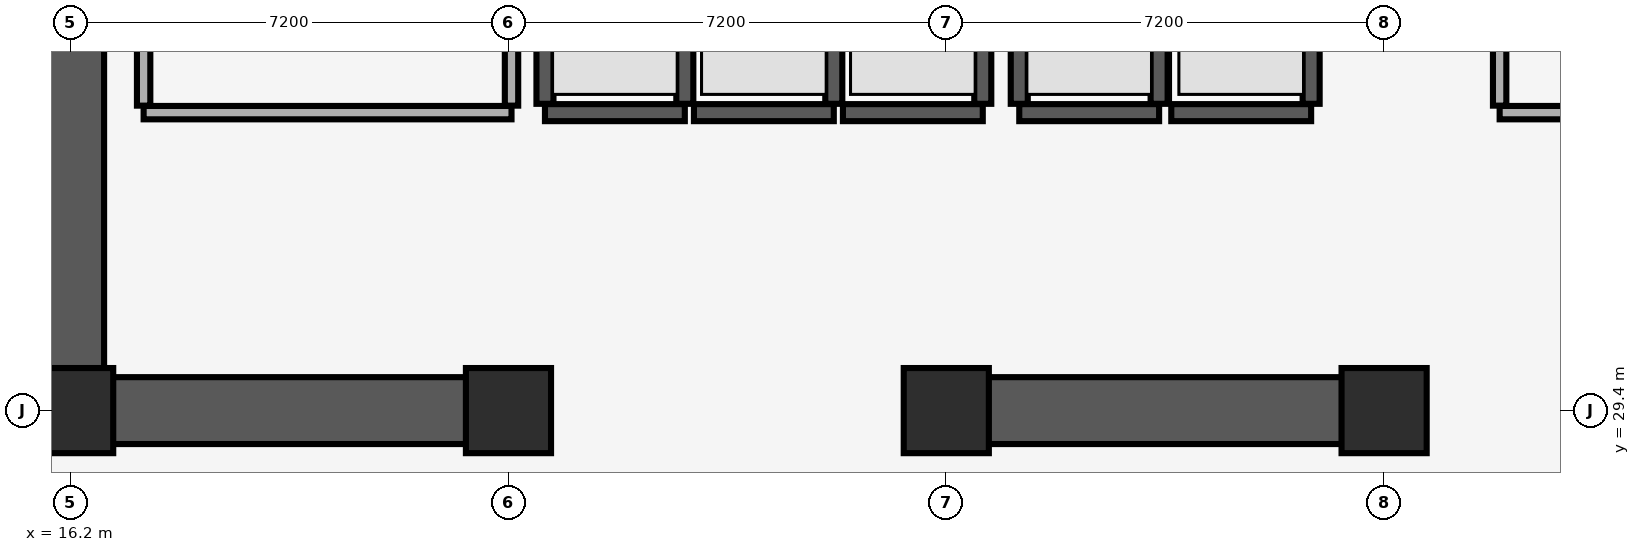
"""IFC4 building model, lengths in metres.
Left out: names, types, materials, properties, quantities, classifications, styles, units other than length and angle.
Written with IfcOpenShell. Run it as: python <this file> out.ifc"""

import sys

from ifc_helpers import new_model, si_unit, direction, frame, frame_2d, origin, origin_2d, place, context, subcontext, project, spatial, rectangle, extrude, element, fill, save


model = new_model("IFC4")
c1 = context("Model", 3, precision=1e-05, world=origin(), true_north=direction((0.0, 1.0)))
c2 = subcontext(c1, "Body", "Model", "MODEL_VIEW")
j1 = project(units=[si_unit("LENGTHUNIT", "METRE"), si_unit("PLANEANGLEUNIT", "RADIAN")], contexts=[c1])
p1 = place(None, origin())
s1 = spatial("IfcSite", under=j1, at=p1, CompositionType="ELEMENT")
p2 = place(p1, origin())
s2 = spatial("IfcBuilding", under=s1, at=p2, CompositionType="ELEMENT")
p3 = place(p2, frame((0.0, 0.0, 8.0)))
s3 = spatial("IfcBuildingStorey", under=s2, at=p3, CompositionType="ELEMENT", Elevation=8.0)
for number, where, z_axis, x_axis in (
    (1, (16.2, 29.4, 0.0), (0.0, 0.0, 1.0), (1.0, 0.0, 0.0)),
    (2, (23.4, 29.4, 0.0), (0.0, 0.0, 1.0), (1.0, 0.0, 0.0)),
    (3, (30.6, 29.4, 0.0), (0.0, 0.0, 1.0), (1.0, 0.0, 0.0)),
    (4, (37.8, 29.4, 0.0), (0.0, 0.0, 1.0), (1.0, 0.0, 0.0)),
):
    element("IfcColumn", number, at=place(p3, frame(where, z_axis=z_axis, x_axis=x_axis)), inside=s3, PredefinedType="COLUMN", context=c2, shape_type="SweptSolid", body=[
        extrude(rectangle(XDim=1.4, YDim=1.4, at=origin_2d()), origin(), (0.0, 0.0, 1.0), 5.68),
    ])
p4 = place(p3, frame((16.2, 29.4, 0.0), z_axis=(0.0, 0.0, 1.0), x_axis=(0.0, 1.0, 0.0)))
e5 = element("IfcWall", 5, at=p4, inside=s3, PredefinedType="SHEAR", context=c2, shape_type="SweptSolid", body=[
    extrude(rectangle(XDim=19.2, YDim=1.1, at=frame_2d((9.6, 0.0))), origin(), (0.0, 0.0, 1.0), 5.68),
])
p5 = place(p3, frame((16.755, 29.4, 0.0), z_axis=(0.0, 0.0, 1.0), x_axis=(1.0, 0.0, 0.0)))
e6 = element("IfcWall", 6, at=p5, inside=s3, PredefinedType="SHEAR", context=c2, shape_type="SweptSolid", body=[
    extrude(rectangle(XDim=6.845, YDim=1.1, at=frame_2d((3.423, 0.0))), origin(), (0.0, 0.0, 1.0), 5.68),
])
p6 = place(p3, frame((30.4, 29.4, 0.0), z_axis=(0.0, 0.0, 1.0), x_axis=(1.0, 0.0, 0.0)))
e7 = element("IfcWall", 7, at=p6, inside=s3, PredefinedType="SHEAR", context=c2, shape_type="SweptSolid", body=[
    extrude(rectangle(XDim=7.6, YDim=1.1, at=frame_2d((3.8, 0.0))), origin(), (0.0, 0.0, 1.0), 5.68),
])
p7 = place(p3, frame((24.0, 34.3, 0.0), z_axis=(0.0, 0.0, 1.0), x_axis=(1.0, 0.0, 0.0)))
e8 = element("IfcWall", 8, at=p7, inside=s3, PredefinedType="SHEAR", context=c2, shape_type="SweptSolid", body=[
    extrude(rectangle(XDim=2.3, YDim=0.28, at=frame_2d((1.15, 0.0))), origin(), (0.0, 0.0, 1.0), 5.68),
])
p8 = place(p7, frame((0.6, 0.0, 0.0)))
e9 = element("IfcOpeningElement", 9, at=p8, cuts=e8, PredefinedType="OPENING", context=c2, shape_type="SweptSolid", body=[
    extrude(rectangle(XDim=1.1, YDim=2.2, at=frame_2d((0.55, 1.1))), frame((0.0, 0.15, 0.0), z_axis=(0.0, -1.0, 0.0), x_axis=(1.0, 0.0, 0.0)), (0.0, 0.0, 1.0), 0.3),
])
for number, where, z_axis, x_axis in (
    (10, (24.0, 34.445, 0.0), (0.0, 0.0, 1.0), (0.0, 1.0, 0.0)),
    (11, (26.3, 34.445, 0.0), (0.0, 0.0, 1.0), (0.0, 1.0, 0.0)),
):
    element("IfcWall", number, at=place(p3, frame(where, z_axis=z_axis, x_axis=x_axis)), inside=s3, PredefinedType="SHEAR", context=c2, shape_type="SweptSolid", body=[
        extrude(rectangle(XDim=2.01, YDim=0.28, at=frame_2d((1.005, 0.0))), origin(), (0.0, 0.0, 1.0), 5.68),
    ])
p9 = place(p3, frame((26.45, 34.3, 0.0), z_axis=(0.0, 0.0, 1.0), x_axis=(1.0, 0.0, 0.0)))
e12 = element("IfcWall", 12, at=p9, inside=s3, PredefinedType="SHEAR", context=c2, shape_type="SweptSolid", body=[
    extrude(rectangle(XDim=2.3, YDim=0.28, at=frame_2d((1.15, 0.0))), origin(), (0.0, 0.0, 1.0), 5.68),
])
p10 = place(p9, frame((0.6, 0.0, 0.0)))
e13 = element("IfcOpeningElement", 13, at=p10, cuts=e12, PredefinedType="OPENING", context=c2, shape_type="SweptSolid", body=[
    extrude(rectangle(XDim=1.1, YDim=2.2, at=frame_2d((0.55, 1.1))), frame((0.0, 0.15, 0.0), z_axis=(0.0, -1.0, 0.0), x_axis=(1.0, 0.0, 0.0)), (0.0, 0.0, 1.0), 0.3),
])
p11 = place(p3, frame((28.75, 34.445, 0.0), z_axis=(0.0, 0.0, 1.0), x_axis=(0.0, 1.0, 0.0)))
e14 = element("IfcWall", 14, at=p11, inside=s3, PredefinedType="SHEAR", context=c2, shape_type="SweptSolid", body=[
    extrude(rectangle(XDim=2.01, YDim=0.28, at=frame_2d((1.005, 0.0))), origin(), (0.0, 0.0, 1.0), 5.68),
])
p12 = place(p3, frame((28.9, 34.3, 0.0), z_axis=(0.0, 0.0, 1.0), x_axis=(1.0, 0.0, 0.0)))
e15 = element("IfcWall", 15, at=p12, inside=s3, PredefinedType="SHEAR", context=c2, shape_type="SweptSolid", body=[
    extrude(rectangle(XDim=2.3, YDim=0.28, at=frame_2d((1.15, 0.0))), origin(), (0.0, 0.0, 1.0), 5.68),
])
p13 = place(p12, frame((0.6, 0.0, 0.0)))
e16 = element("IfcOpeningElement", 16, at=p13, cuts=e15, PredefinedType="OPENING", context=c2, shape_type="SweptSolid", body=[
    extrude(rectangle(XDim=1.1, YDim=2.2, at=frame_2d((0.55, 1.1))), frame((0.0, 0.15, 0.0), z_axis=(0.0, -1.0, 0.0), x_axis=(1.0, 0.0, 0.0)), (0.0, 0.0, 1.0), 0.3),
])
p14 = place(p3, frame((31.2, 34.445, 0.0), z_axis=(0.0, 0.0, 1.0), x_axis=(0.0, 1.0, 0.0)))
e17 = element("IfcWall", 17, at=p14, inside=s3, PredefinedType="SHEAR", context=c2, shape_type="SweptSolid", body=[
    extrude(rectangle(XDim=2.01, YDim=0.28, at=frame_2d((1.005, 0.0))), origin(), (0.0, 0.0, 1.0), 5.68),
])
p15 = place(p3, frame((31.8, 34.3, 0.0), z_axis=(0.0, 0.0, 1.0), x_axis=(1.0, 0.0, 0.0)))
e18 = element("IfcWall", 18, at=p15, inside=s3, PredefinedType="SHEAR", context=c2, shape_type="SweptSolid", body=[
    extrude(rectangle(XDim=2.3, YDim=0.28, at=frame_2d((1.15, 0.0))), origin(), (0.0, 0.0, 1.0), 5.68),
])
p16 = place(p15, frame((0.6, 0.0, 0.0)))
e19 = element("IfcOpeningElement", 19, at=p16, cuts=e18, PredefinedType="OPENING", context=c2, shape_type="SweptSolid", body=[
    extrude(rectangle(XDim=1.1, YDim=2.2, at=frame_2d((0.55, 1.1))), frame((0.0, 0.15, 0.0), z_axis=(0.0, -1.0, 0.0), x_axis=(1.0, 0.0, 0.0)), (0.0, 0.0, 1.0), 0.3),
])
for number, where, z_axis, x_axis in (
    (20, (31.8, 34.445, 0.0), (0.0, 0.0, 1.0), (0.0, 1.0, 0.0)),
    (21, (34.1, 34.445, 0.0), (0.0, 0.0, 1.0), (0.0, 1.0, 0.0)),
):
    element("IfcWall", number, at=place(p3, frame(where, z_axis=z_axis, x_axis=x_axis)), inside=s3, PredefinedType="SHEAR", context=c2, shape_type="SweptSolid", body=[
        extrude(rectangle(XDim=2.01, YDim=0.28, at=frame_2d((1.005, 0.0))), origin(), (0.0, 0.0, 1.0), 5.68),
    ])
p17 = place(p3, frame((34.3, 34.3, 0.0), z_axis=(0.0, 0.0, 1.0), x_axis=(1.0, 0.0, 0.0)))
e22 = element("IfcWall", 22, at=p17, inside=s3, PredefinedType="SHEAR", context=c2, shape_type="SweptSolid", body=[
    extrude(rectangle(XDim=2.3, YDim=0.28, at=frame_2d((1.15, 0.0))), origin(), (0.0, 0.0, 1.0), 5.68),
])
p18 = place(p17, frame((0.6, 0.0, 0.0)))
e23 = element("IfcOpeningElement", 23, at=p18, cuts=e22, PredefinedType="OPENING", context=c2, shape_type="SweptSolid", body=[
    extrude(rectangle(XDim=1.1, YDim=2.2, at=frame_2d((0.55, 1.1))), frame((0.0, 0.15, 0.0), z_axis=(0.0, -1.0, 0.0), x_axis=(1.0, 0.0, 0.0)), (0.0, 0.0, 1.0), 0.3),
])
p19 = place(p3, frame((36.6, 34.445, 0.0), z_axis=(0.0, 0.0, 1.0), x_axis=(0.0, 1.0, 0.0)))
e24 = element("IfcWall", 24, at=p19, inside=s3, PredefinedType="SHEAR", context=c2, shape_type="SweptSolid", body=[
    extrude(rectangle(XDim=2.01, YDim=0.28, at=frame_2d((1.005, 0.0))), origin(), (0.0, 0.0, 1.0), 5.68),
])
p20 = place(p3, frame((17.4, 34.3, 0.0), z_axis=(0.0, 0.0, 1.0), x_axis=(1.0, 0.0, 0.0)))
e25 = element("IfcWall", 25, at=p20, inside=s3, PredefinedType="PARTITIONING", context=c2, shape_type="SweptSolid", body=[
    extrude(rectangle(XDim=6.05, YDim=0.22, at=frame_2d((3.025, 0.0))), origin(), (0.0, 0.0, 1.0), 5.68),
])
p21 = place(p20, frame((2.2, 0.0, 0.0)))
e26 = element("IfcOpeningElement", 26, at=p21, cuts=e25, PredefinedType="OPENING", context=c2, shape_type="SweptSolid", body=[
    extrude(rectangle(XDim=1.2, YDim=2.15, at=frame_2d((0.6, 1.075))), frame((0.0, 0.12, 0.0), z_axis=(0.0, -1.0, 0.0), x_axis=(1.0, 0.0, 0.0)), (0.0, 0.0, 1.0), 0.24),
])
p22 = place(p3, frame((17.4, 34.415, 0.0), z_axis=(0.0, 0.0, 1.0), x_axis=(0.0, 1.0, 0.0)))
e27 = element("IfcWall", 27, at=p22, inside=s3, PredefinedType="PARTITIONING", context=c2, shape_type="SweptSolid", body=[
    extrude(rectangle(XDim=5.43, YDim=0.22, at=frame_2d((2.715, 0.0))), origin(), (0.0, 0.0, 1.0), 5.68),
])
p23 = place(p3, frame((23.45, 34.415, 0.0), z_axis=(0.0, 0.0, 1.0), x_axis=(0.0, 1.0, 0.0)))
e28 = element("IfcWall", 28, at=p23, inside=s3, PredefinedType="PARTITIONING", context=c2, shape_type="SweptSolid", body=[
    extrude(rectangle(XDim=5.64, YDim=0.22, at=frame_2d((2.82, 0.0))), origin(), (0.0, 0.0, 1.0), 5.68),
])
p24 = place(p3, frame((39.7, 34.3, 0.0), z_axis=(0.0, 0.0, 1.0), x_axis=(1.0, 0.0, 0.0)))
e29 = element("IfcWall", 29, at=p24, inside=s3, PredefinedType="PARTITIONING", context=c2, shape_type="SweptSolid", body=[
    extrude(rectangle(XDim=4.6, YDim=0.22, at=frame_2d((2.3, 0.0))), origin(), (0.0, 0.0, 1.0), 5.68),
])
p25 = place(p24, frame((1.7, 0.0, 0.0)))
e30 = element("IfcOpeningElement", 30, at=p25, cuts=e29, PredefinedType="OPENING", context=c2, shape_type="SweptSolid", body=[
    extrude(rectangle(XDim=1.2, YDim=2.15, at=frame_2d((0.6, 1.075))), frame((0.0, 0.12, 0.0), z_axis=(0.0, -1.0, 0.0), x_axis=(1.0, 0.0, 0.0)), (0.0, 0.0, 1.0), 0.24),
])
p26 = place(p3, frame((39.7, 34.415, 0.0), z_axis=(0.0, 0.0, 1.0), x_axis=(0.0, 1.0, 0.0)))
e31 = element("IfcWall", 31, at=p26, inside=s3, PredefinedType="PARTITIONING", context=c2, shape_type="SweptSolid", body=[
    extrude(rectangle(XDim=5.785, YDim=0.22, at=frame_2d((2.893, 0.0))), origin(), (0.0, 0.0, 1.0), 5.68),
])
p27 = place(p8, origin())
e32 = element("IfcDoor", 32, at=p27, inside=s3, OperationType="DOUBLE_DOOR_SLIDING", PredefinedType="DOOR", context=c2, shape_type="SweptSolid", body=[
    extrude(rectangle(XDim=1.1, YDim=2.2, at=frame_2d((0.55, 1.1))), frame((0.0, 0.025, 0.0), z_axis=(0.0, -1.0, 0.0), x_axis=(1.0, 0.0, 0.0)), (0.0, 0.0, 1.0), 0.05),
])
fill(e9, e32)
p28 = place(p10, origin())
e33 = element("IfcDoor", 33, at=p28, inside=s3, OperationType="DOUBLE_DOOR_SLIDING", PredefinedType="DOOR", context=c2, shape_type="SweptSolid", body=[
    extrude(rectangle(XDim=1.1, YDim=2.2, at=frame_2d((0.55, 1.1))), frame((0.0, 0.025, 0.0), z_axis=(0.0, -1.0, 0.0), x_axis=(1.0, 0.0, 0.0)), (0.0, 0.0, 1.0), 0.05),
])
fill(e13, e33)
p29 = place(p13, origin())
e34 = element("IfcDoor", 34, at=p29, inside=s3, OperationType="DOUBLE_DOOR_SLIDING", PredefinedType="DOOR", context=c2, shape_type="SweptSolid", body=[
    extrude(rectangle(XDim=1.1, YDim=2.2, at=frame_2d((0.55, 1.1))), frame((0.0, 0.025, 0.0), z_axis=(0.0, -1.0, 0.0), x_axis=(1.0, 0.0, 0.0)), (0.0, 0.0, 1.0), 0.05),
])
fill(e16, e34)
p30 = place(p16, origin())
e35 = element("IfcDoor", 35, at=p30, inside=s3, OperationType="DOUBLE_DOOR_SLIDING", PredefinedType="DOOR", context=c2, shape_type="SweptSolid", body=[
    extrude(rectangle(XDim=1.1, YDim=2.2, at=frame_2d((0.55, 1.1))), frame((0.0, 0.025, 0.0), z_axis=(0.0, -1.0, 0.0), x_axis=(1.0, 0.0, 0.0)), (0.0, 0.0, 1.0), 0.05),
])
fill(e19, e35)
p31 = place(p18, origin())
e36 = element("IfcDoor", 36, at=p31, inside=s3, OperationType="DOUBLE_DOOR_SLIDING", PredefinedType="DOOR", context=c2, shape_type="SweptSolid", body=[
    extrude(rectangle(XDim=1.1, YDim=2.2, at=frame_2d((0.55, 1.1))), frame((0.0, 0.025, 0.0), z_axis=(0.0, -1.0, 0.0), x_axis=(1.0, 0.0, 0.0)), (0.0, 0.0, 1.0), 0.05),
])
fill(e23, e36)
p32 = place(p21, origin())
e37 = element("IfcDoor", 37, at=p32, inside=s3, OperationType="SINGLE_SWING_LEFT", PredefinedType="DOOR", context=c2, shape_type="SweptSolid", body=[
    extrude(rectangle(XDim=1.2, YDim=2.15, at=frame_2d((0.6, 1.075))), frame((0.0, 0.025, 0.0), z_axis=(0.0, -1.0, 0.0), x_axis=(1.0, 0.0, 0.0)), (0.0, 0.0, 1.0), 0.05),
])
fill(e26, e37)
save(model, sys.argv[1])
